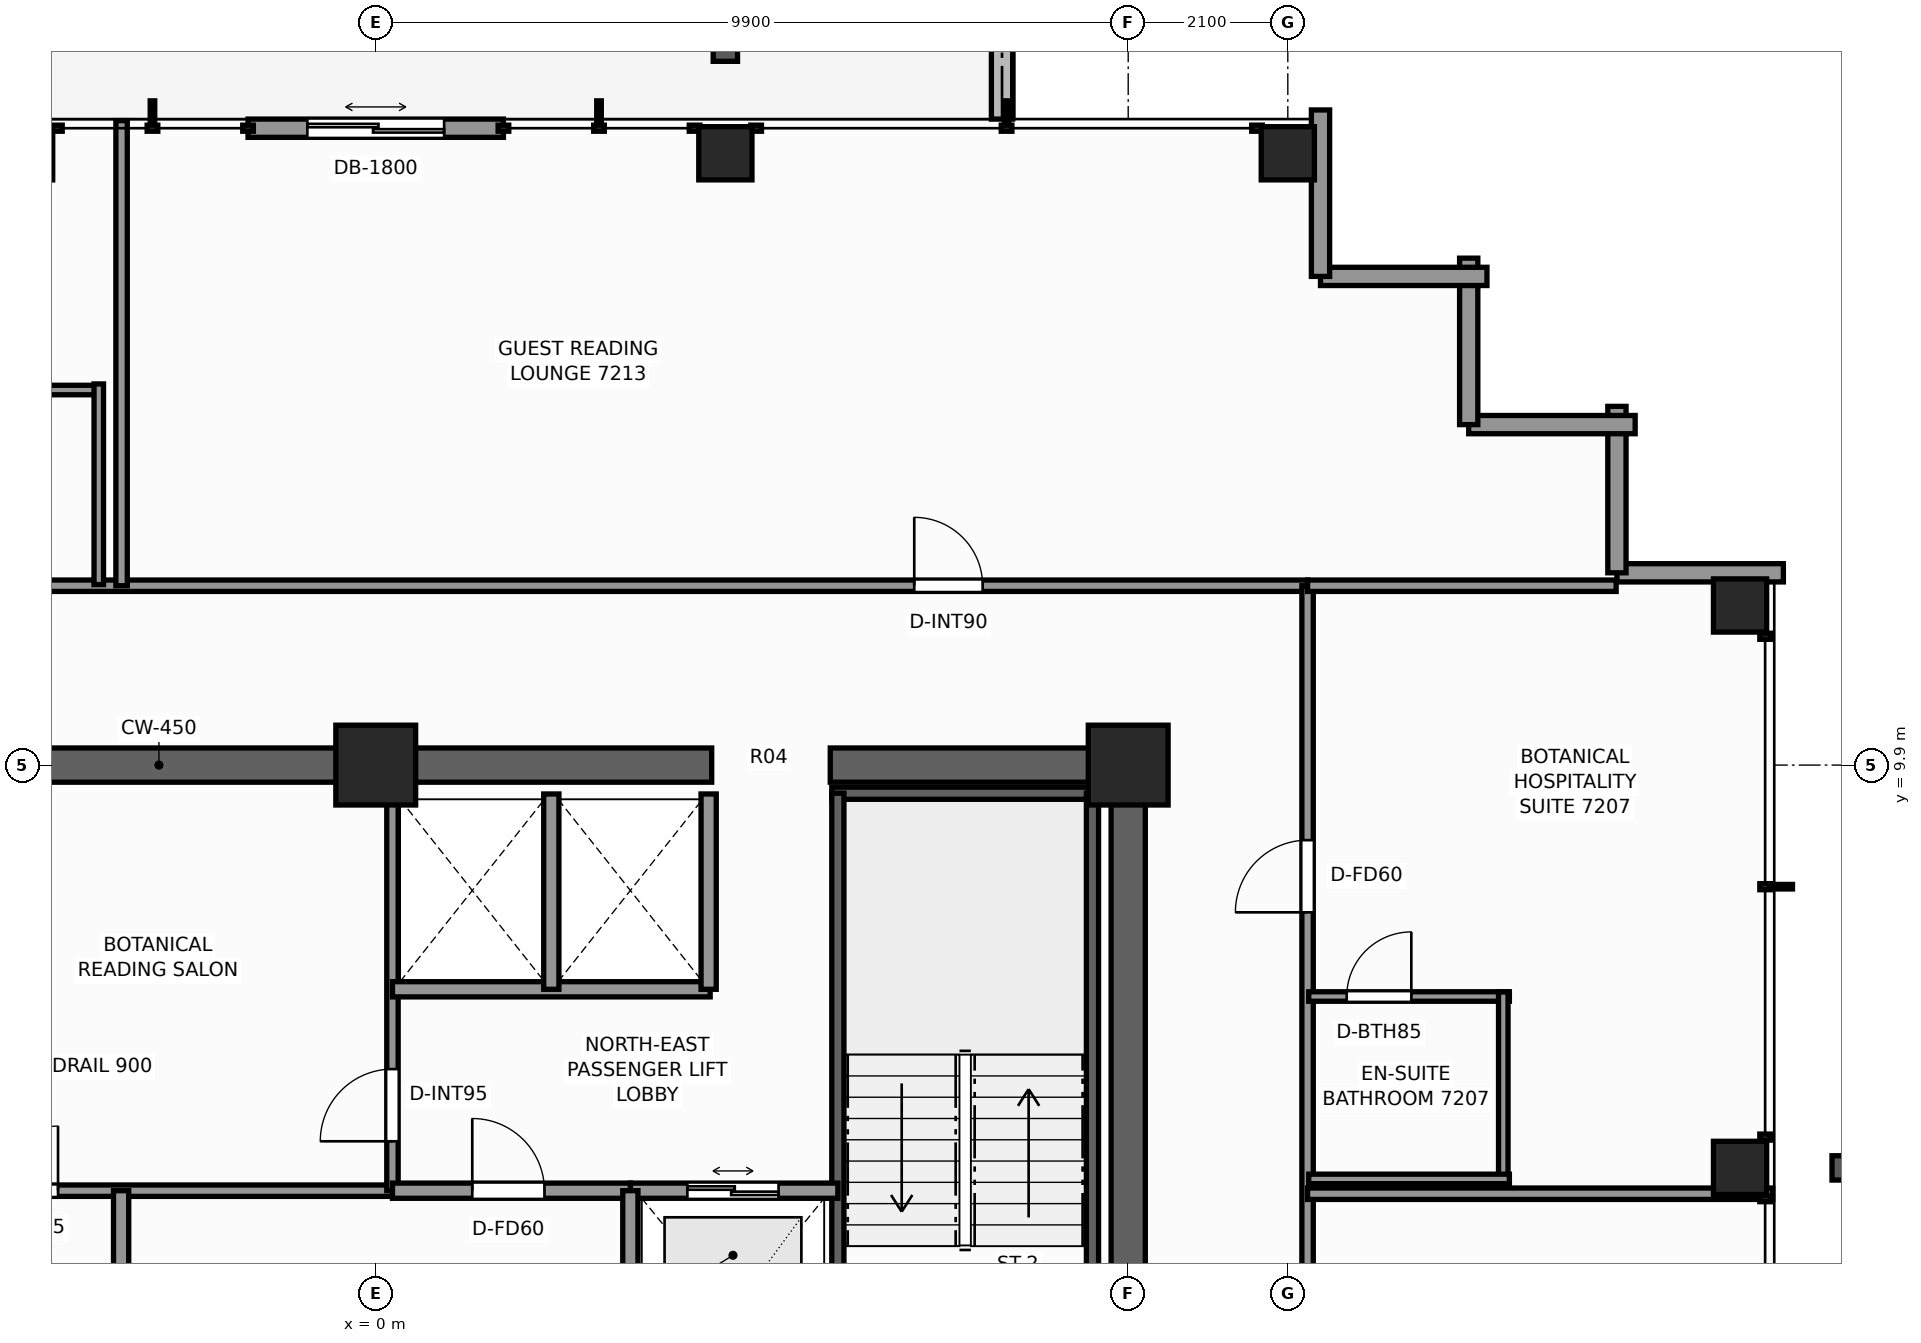
"""IFC4 building model, lengths in metres.
Left out: names, types, materials, properties, quantities, classifications, styles, units other than length and angle.
Written with IfcOpenShell. Run it as: python <this file> out.ifc"""

import sys

from ifc_helpers import new_model, si_unit, direction, frame, frame_2d, origin, origin_2d, place, context, subcontext, project, spatial, rectangle, extrude, element, fill, save


model = new_model("IFC4")
c1 = context("Model", 3, precision=1e-05, world=origin(), true_north=direction((0.0, 1.0)))
c2 = subcontext(c1, "Body", "Model", "MODEL_VIEW")
j1 = project(units=[si_unit("LENGTHUNIT", "METRE"), si_unit("PLANEANGLEUNIT", "RADIAN")], contexts=[c1])
p1 = place(None, origin())
s1 = spatial("IfcSite", under=j1, at=p1, CompositionType="ELEMENT")
p2 = place(p1, origin())
s2 = spatial("IfcBuilding", under=s1, at=p2, CompositionType="ELEMENT")
p3 = place(p2, frame((0.0, 0.0, 247.9)))
s3 = spatial("IfcBuildingStorey", under=s2, at=p3, CompositionType="ELEMENT", Elevation=247.9)
p4 = place(p3, frame((-10.125, 9.9, 0.0), z_axis=(0.0, 0.0, 1.0), x_axis=(1.0, 0.0, 0.0)))
e1 = element("IfcWall", 1, at=p4, inside=s3, PredefinedType="SHEAR", context=c2, shape_type="SweptSolid", body=[
    extrude(rectangle(XDim=14.545, YDim=0.45, at=frame_2d((7.272, 0.0))), origin(), (0.0, 0.0, 1.0), 3.5),
])
p5 = place(p3, frame((5.98, 9.9, 0.0), z_axis=(0.0, 0.0, 1.0), x_axis=(1.0, 0.0, 0.0)))
e2 = element("IfcWall", 2, at=p5, inside=s3, PredefinedType="SHEAR", context=c2, shape_type="SweptSolid", body=[
    extrude(rectangle(XDim=4.145, YDim=0.45, at=frame_2d((2.073, 0.0))), origin(), (0.0, 0.0, 1.0), 3.5),
])
p6 = place(p3, frame((9.9, -3.7, 0.0), z_axis=(0.0, 0.0, 1.0), x_axis=(0.0, 1.0, 0.0)))
e3 = element("IfcWall", 3, at=p6, inside=s3, PredefinedType="SHEAR", context=c2, shape_type="SweptSolid", body=[
    extrude(rectangle(XDim=13.375, YDim=0.45, at=frame_2d((6.688, 0.0))), origin(), (0.0, 0.0, 1.0), 3.5),
])
p7 = place(p6, frame((0.35, 0.0, 0.0)))
e4 = element("IfcOpeningElement", 4, at=p7, cuts=e3, PredefinedType="OPENING", context=c2, shape_type="SweptSolid", body=[
    extrude(rectangle(XDim=1.1, YDim=2.2, at=frame_2d((0.55, 1.1))), frame((0.0, 0.235, 0.0), z_axis=(0.0, -1.0, 0.0), x_axis=(1.0, 0.0, 0.0)), (0.0, 0.0, 1.0), 0.47),
])
for number, where, z_axis, x_axis in (
    (5, (9.9, 9.9, 0.0), (0.0, 0.0, 1.0), (1.0, 0.0, 0.0)),
    (6, (0.0, 9.9, 0.0), (0.0, 0.0, 1.0), (1.0, 0.0, 0.0)),
):
    element("IfcColumn", number, at=place(p3, frame(where, z_axis=z_axis, x_axis=x_axis)), inside=s3, PredefinedType="COLUMN", context=c2, shape_type="SweptSolid", body=[
        extrude(rectangle(XDim=1.05, YDim=1.05, at=origin_2d()), origin(), (0.0, 0.0, 1.0), 3.5),
    ])
for number, where, z_axis, x_axis in (
    (7, (-4.6, 17.95, 0.0), (0.0, 0.0, 1.0), (1.0, 0.0, 0.0)),
    (8, (4.6, 17.95, 0.0), (0.0, 0.0, 1.0), (1.0, 0.0, 0.0)),
    (9, (12.0, 17.95, 0.0), (0.0, 0.0, 1.0), (1.0, 0.0, 0.0)),
    (10, (17.95, 4.6, 0.0), (0.0, 0.0, 1.0), (1.0, 0.0, 0.0)),
    (11, (17.95, 12.0, 0.0), (0.0, 0.0, 1.0), (1.0, 0.0, 0.0)),
):
    element("IfcColumn", number, at=place(p3, frame(where, z_axis=z_axis, x_axis=x_axis)), inside=s3, PredefinedType="COLUMN", context=c2, shape_type="SweptSolid", body=[
        extrude(rectangle(XDim=0.7, YDim=0.7, at=origin_2d()), origin(), (0.0, 0.0, 1.0), 3.5),
    ])
p8 = place(p3, frame((8.24, 18.4, -0.07), z_axis=(0.0, 0.0, 1.0), x_axis=(0.0, 1.0, 0.0)))
e12 = element("IfcWall", 12, at=p8, inside=s3, PredefinedType="PARAPET", context=c2, shape_type="SweptSolid", body=[
    extrude(rectangle(XDim=3.42, YDim=0.28, at=frame_2d((1.71, 0.0))), origin(), (0.0, 0.0, 1.0), 0.42),
])
p9 = place(p3, frame((16.33, 12.43, 0.0), z_axis=(0.0, 0.0, 1.0), x_axis=(1.0, 0.0, 0.0)))
e13 = element("IfcWall", 13, at=p9, inside=s3, PredefinedType="STANDARD", context=c2, shape_type="SweptSolid", body=[
    extrude(rectangle(XDim=2.19, YDim=0.24, at=frame_2d((1.095, 0.0))), origin(), (0.0, 0.0, 1.0), 2.633),
])
for number, where, z_axis, x_axis in (
    (14, (16.33, 14.62, 0.0), (0.0, 0.0, 1.0), (0.0, -1.0, 0.0)),
    (15, (14.38, 14.38, 0.0), (0.0, 0.0, 1.0), (1.0, 0.0, 0.0)),
    (16, (14.38, 16.57, 0.0), (0.0, 0.0, 1.0), (0.0, -1.0, 0.0)),
    (17, (12.43, 16.33, 0.0), (0.0, 0.0, 1.0), (1.0, 0.0, 0.0)),
):
    element("IfcWall", number, at=place(p3, frame(where, z_axis=z_axis, x_axis=x_axis)), inside=s3, PredefinedType="STANDARD", context=c2, shape_type="SweptSolid", body=[
        extrude(rectangle(XDim=2.19, YDim=0.24, at=frame_2d((1.095, 0.0))), origin(), (0.0, 0.0, 1.0), 2.633),
    ])
p10 = place(p3, frame((12.43, 18.52, 0.0), z_axis=(0.0, 0.0, 1.0), x_axis=(0.0, -1.0, 0.0)))
e18 = element("IfcWall", 18, at=p10, inside=s3, PredefinedType="STANDARD", context=c2, shape_type="SweptSolid", body=[
    extrude(rectangle(XDim=2.19, YDim=0.24, at=frame_2d((1.095, 0.0))), origin(), (0.0, 0.0, 1.0), 2.633),
])
p11 = place(p3, frame((-1.68, 18.28, 0.0), z_axis=(0.0, 0.0, 1.0), x_axis=(1.0, 0.0, 0.0)))
e19 = element("IfcWall", 19, at=p11, inside=s3, PredefinedType="STANDARD", context=c2, shape_type="SweptSolid", body=[
    extrude(rectangle(XDim=3.36, YDim=0.24, at=frame_2d((1.68, 0.0))), origin(), (0.0, 0.0, 1.0), 3.25),
])
p12 = place(p11, frame((0.78, 0.0, 0.0)))
e20 = element("IfcOpeningElement", 20, at=p12, cuts=e19, PredefinedType="OPENING", context=c2, shape_type="SweptSolid", body=[
    extrude(rectangle(XDim=1.8, YDim=2.2, at=frame_2d((0.9, 1.1))), frame((0.0, 0.13, 0.0), z_axis=(0.0, -1.0, 0.0), x_axis=(1.0, 0.0, 0.0)), (0.0, 0.0, 1.0), 0.26),
])
p13 = place(p3, frame((6.0, 9.53, 0.0), z_axis=(0.0, 0.0, 1.0), x_axis=(1.0, 0.0, 0.0)))
e21 = element("IfcWall", 21, at=p13, inside=s3, PredefinedType="SHEAR", context=c2, shape_type="SweptSolid", body=[
    extrude(rectangle(XDim=3.52, YDim=0.16, at=frame_2d((1.76, 0.0))), origin(), (0.0, 0.0, 1.0), 3.5),
])
for number, where, z_axis, x_axis in (
    (22, (6.08, 1.97, 0.0), (0.0, 0.0, 1.0), (0.0, 1.0, 0.0)),
    (23, (9.43, 1.97, 0.0), (0.0, 0.0, 1.0), (0.0, 1.0, 0.0)),
):
    element("IfcWall", number, at=place(p3, frame(where, z_axis=z_axis, x_axis=x_axis)), inside=s3, PredefinedType="SHEAR", context=c2, shape_type="SweptSolid", body=[
        extrude(rectangle(XDim=7.56, YDim=0.16, at=frame_2d((3.78, 0.0))), origin(), (0.0, 0.0, 1.0), 3.5),
    ])
p14 = place(p3, frame((3.35, 4.3, 0.0), z_axis=(0.0, 0.0, 1.0), x_axis=(1.0, 0.0, 0.0)))
e24 = element("IfcWall", 24, at=p14, inside=s3, PredefinedType="SOLIDWALL", context=c2, shape_type="SweptSolid", body=[
    extrude(rectangle(XDim=2.73, YDim=0.2, at=frame_2d((1.365, 0.0))), origin(), (0.0, 0.0, 1.0), 3.25),
])
p15 = place(p14, frame((0.75, 0.0, 0.0)))
e25 = element("IfcOpeningElement", 25, at=p15, cuts=e24, PredefinedType="OPENING", context=c2, shape_type="SweptSolid", body=[
    extrude(rectangle(XDim=1.2, YDim=2.25, at=frame_2d((0.6, 1.125))), frame((0.0, 0.11, 0.0), z_axis=(0.0, -1.0, 0.0), x_axis=(1.0, 0.0, 0.0)), (0.0, 0.0, 1.0), 0.22),
])
p16 = place(p3, frame((-6.08, 4.3, 0.0), z_axis=(0.0, 0.0, 1.0), x_axis=(1.0, 0.0, 0.0)))
e26 = element("IfcWall", 26, at=p16, inside=s3, PredefinedType="PARTITIONING", context=c2, shape_type="SweptSolid", body=[
    extrude(rectangle(XDim=6.3, YDim=0.15, at=frame_2d((3.15, 0.0))), origin(), (0.0, 0.0, 1.0), 3.25),
])
p17 = place(p16, frame((1.05, 0.0, 0.0)))
e27 = element("IfcOpeningElement", 27, at=p17, cuts=e26, PredefinedType="OPENING", context=c2, shape_type="SweptSolid", body=[
    extrude(rectangle(XDim=0.85, YDim=2.03, at=frame_2d((0.425, 1.015))), frame((0.0, 0.085, 0.0), z_axis=(0.0, -1.0, 0.0), x_axis=(1.0, 0.0, 0.0)), (0.0, 0.0, 1.0), 0.17),
])
p18 = place(p3, frame((0.22, 4.3, 0.0), z_axis=(0.0, 0.0, 1.0), x_axis=(0.0, 1.0, 0.0)))
e28 = element("IfcWall", 28, at=p18, inside=s3, PredefinedType="PARTITIONING", context=c2, shape_type="SweptSolid", body=[
    extrude(rectangle(XDim=5.22, YDim=0.15, at=frame_2d((2.61, 0.0))), origin(), (0.0, 0.0, 1.0), 3.25),
])
p19 = place(p18, frame((0.65, 0.0, 0.0)))
e29 = element("IfcOpeningElement", 29, at=p19, cuts=e28, PredefinedType="OPENING", context=c2, shape_type="SweptSolid", body=[
    extrude(rectangle(XDim=0.95, YDim=2.06, at=frame_2d((0.475, 1.03))), frame((0.0, 0.085, 0.0), z_axis=(0.0, -1.0, 0.0), x_axis=(1.0, 0.0, 0.0)), (0.0, 0.0, 1.0), 0.17),
])
p20 = place(p3, frame((0.22, 6.95, 0.0), z_axis=(0.0, 0.0, 1.0), x_axis=(1.0, 0.0, 0.0)))
e30 = element("IfcWall", 30, at=p20, inside=s3, PredefinedType="SOLIDWALL", context=c2, shape_type="SweptSolid", body=[
    extrude(rectangle(XDim=4.18, YDim=0.2, at=frame_2d((2.09, 0.0))), origin(), (0.0, 0.0, 1.0), 3.25),
])
for number, where, z_axis, x_axis in (
    (31, (4.38, 6.95, 0.0), (0.0, 0.0, 1.0), (0.0, 1.0, 0.0)),
    (32, (2.31, 6.95, 0.0), (0.0, 0.0, 1.0), (0.0, 1.0, 0.0)),
):
    element("IfcWall", number, at=place(p3, frame(where, z_axis=z_axis, x_axis=x_axis)), inside=s3, PredefinedType="SOLIDWALL", context=c2, shape_type="SweptSolid", body=[
        extrude(rectangle(XDim=2.57, YDim=0.2, at=frame_2d((1.285, 0.0))), origin(), (0.0, 0.0, 1.0), 3.25),
    ])
p21 = place(p3, frame((0.22, 4.3, 0.0), z_axis=(0.0, 0.0, 1.0), x_axis=(1.0, 0.0, 0.0)))
e33 = element("IfcWall", 33, at=p21, inside=s3, PredefinedType="SOLIDWALL", context=c2, shape_type="SweptSolid", body=[
    extrude(rectangle(XDim=3.13, YDim=0.2, at=frame_2d((1.565, 0.0))), origin(), (0.0, 0.0, 1.0), 3.25),
])
p22 = place(p21, frame((1.05, 0.0, 0.0)))
e34 = element("IfcOpeningElement", 34, at=p22, cuts=e33, PredefinedType="OPENING", context=c2, shape_type="SweptSolid", body=[
    extrude(rectangle(XDim=0.95, YDim=2.06, at=frame_2d((0.475, 1.03))), frame((0.0, 0.11, 0.0), z_axis=(0.0, -1.0, 0.0), x_axis=(1.0, 0.0, 0.0)), (0.0, 0.0, 1.0), 0.22),
])
for number, where, z_axis, x_axis in (
    (35, (-3.35, 1.1, 0.0), (0.0, 0.0, 1.0), (0.0, 1.0, 0.0)),
    (36, (3.35, 1.1, 0.0), (0.0, 0.0, 1.0), (0.0, 1.0, 0.0)),
):
    element("IfcWall", number, at=place(p3, frame(where, z_axis=z_axis, x_axis=x_axis)), inside=s3, PredefinedType="SOLIDWALL", context=c2, shape_type="SweptSolid", body=[
        extrude(rectangle(XDim=3.2, YDim=0.2, at=frame_2d((1.6, 0.0))), origin(), (0.0, 0.0, 1.0), 3.25),
    ])
p23 = place(p3, frame((-12.58, 12.26, 0.0), z_axis=(0.0, 0.0, 1.0), x_axis=(1.0, 0.0, 0.0)))
e37 = element("IfcWall", 37, at=p23, inside=s3, PredefinedType="PARTITIONING", context=c2, shape_type="SweptSolid", body=[
    extrude(rectangle(XDim=24.84, YDim=0.15, at=frame_2d((12.42, 0.0))), origin(), (0.0, 0.0, 1.0), 2.539),
])
p24 = place(p23, frame((4.073, 0.0, 0.0)))
e38 = element("IfcOpeningElement", 38, at=p24, cuts=e37, PredefinedType="OPENING", context=c2, shape_type="SweptSolid", body=[
    extrude(rectangle(XDim=0.95, YDim=2.06, at=frame_2d((0.475, 1.03))), frame((0.0, 0.085, 0.0), z_axis=(0.0, -1.0, 0.0), x_axis=(1.0, 0.0, 0.0)), (0.0, 0.0, 1.0), 0.17),
])
p25 = place(p23, frame((19.665, 0.0, 0.0)))
e39 = element("IfcOpeningElement", 39, at=p25, cuts=e37, PredefinedType="OPENING", context=c2, shape_type="SweptSolid", body=[
    extrude(rectangle(XDim=0.9, YDim=2.06, at=frame_2d((0.45, 1.03))), frame((0.0, 0.085, 0.0), z_axis=(0.0, -1.0, 0.0), x_axis=(1.0, 0.0, 0.0)), (0.0, 0.0, 1.0), 0.17),
])
p26 = place(p3, frame((12.26, -12.58, 0.0), z_axis=(0.0, 0.0, 1.0), x_axis=(0.0, 1.0, 0.0)))
e40 = element("IfcWall", 40, at=p26, inside=s3, PredefinedType="PARTITIONING", context=c2, shape_type="SweptSolid", body=[
    extrude(rectangle(XDim=24.84, YDim=0.15, at=frame_2d((12.42, 0.0))), origin(), (0.0, 0.0, 1.0), 2.539),
])
p27 = place(p26, frame((4.228, 0.0, 0.0)))
e41 = element("IfcOpeningElement", 41, at=p27, cuts=e40, PredefinedType="OPENING", context=c2, shape_type="SweptSolid", body=[
    extrude(rectangle(XDim=0.95, YDim=2.06, at=frame_2d((0.475, 1.03))), frame((0.0, 0.085, 0.0), z_axis=(0.0, -1.0, 0.0), x_axis=(1.0, 0.0, 0.0)), (0.0, 0.0, 1.0), 0.17),
])
p28 = place(p26, frame((14.135, 0.0, 0.0)))
e42 = element("IfcOpeningElement", 42, at=p28, cuts=e40, PredefinedType="OPENING", context=c2, shape_type="SweptSolid", body=[
    extrude(rectangle(XDim=0.95, YDim=2.06, at=frame_2d((0.475, 1.03))), frame((0.0, 0.085, 0.0), z_axis=(0.0, -1.0, 0.0), x_axis=(1.0, 0.0, 0.0)), (0.0, 0.0, 1.0), 0.17),
])
p29 = place(p26, frame((20.542, 0.0, 0.0)))
e43 = element("IfcOpeningElement", 43, at=p29, cuts=e40, PredefinedType="OPENING", context=c2, shape_type="SweptSolid", body=[
    extrude(rectangle(XDim=0.95, YDim=2.06, at=frame_2d((0.475, 1.03))), frame((0.0, 0.085, 0.0), z_axis=(0.0, -1.0, 0.0), x_axis=(1.0, 0.0, 0.0)), (0.0, 0.0, 1.0), 0.17),
])
p30 = place(p3, frame((12.26, 12.26, 0.0), z_axis=(0.0, 0.0, 1.0), x_axis=(1.0, 0.0, 0.0)))
e44 = element("IfcWall", 44, at=p30, inside=s3, PredefinedType="PARTITIONING", context=c2, shape_type="SweptSolid", body=[
    extrude(rectangle(XDim=4.06, YDim=0.15, at=frame_2d((2.03, 0.0))), origin(), (0.0, 0.0, 1.0), 3.25),
])
p31 = place(p3, frame((12.26, 4.26, 0.0), z_axis=(0.0, 0.0, 1.0), x_axis=(1.0, 0.0, 0.0)))
e45 = element("IfcWall", 45, at=p31, inside=s3, PredefinedType="PARTITIONING", context=c2, shape_type="SweptSolid", body=[
    extrude(rectangle(XDim=6.12, YDim=0.15, at=frame_2d((3.06, 0.0))), origin(), (0.0, 0.0, 1.0), 2.623),
])
p32 = place(p3, frame((12.275, 6.855, 0.0), z_axis=(0.0, 0.0, 1.0), x_axis=(1.0, 0.0, 0.0)))
e46 = element("IfcWall", 46, at=p32, inside=s3, PredefinedType="PARTITIONING", context=c2, shape_type="SweptSolid", body=[
    extrude(rectangle(XDim=2.64, YDim=0.125, at=frame_2d((1.32, 0.0))), origin(), (0.0, 0.0, 1.0), 3.25),
])
p33 = place(p32, frame((0.5, 0.0, 0.0)))
e47 = element("IfcOpeningElement", 47, at=p33, cuts=e46, PredefinedType="OPENING", context=c2, shape_type="SweptSolid", body=[
    extrude(rectangle(XDim=0.85, YDim=2.03, at=frame_2d((0.425, 1.015))), frame((0.0, 0.073, 0.0), z_axis=(0.0, -1.0, 0.0), x_axis=(1.0, 0.0, 0.0)), (0.0, 0.0, 1.0), 0.145),
])
p34 = place(p3, frame((14.835, 4.395, 0.0), z_axis=(0.0, 0.0, 1.0), x_axis=(0.0, 1.0, 0.0)))
e48 = element("IfcWall", 48, at=p34, inside=s3, PredefinedType="PARTITIONING", context=c2, shape_type="SweptSolid", body=[
    extrude(rectangle(XDim=2.52, YDim=0.125, at=frame_2d((1.26, 0.0))), origin(), (0.0, 0.0, 1.0), 2.539),
])
p35 = place(p3, frame((12.275, 4.455, 0.0), z_axis=(0.0, 0.0, 1.0), x_axis=(1.0, 0.0, 0.0)))
e49 = element("IfcWall", 49, at=p35, inside=s3, PredefinedType="PARTITIONING", context=c2, shape_type="SweptSolid", body=[
    extrude(rectangle(XDim=2.64, YDim=0.125, at=frame_2d((1.32, 0.0))), origin(), (0.0, 0.0, 1.0), 2.539),
])
p36 = place(p3, frame((-3.344, 12.26, 0.0), z_axis=(0.0, 0.0, 1.0), x_axis=(0.0, 1.0, 0.0)))
e50 = element("IfcWall", 50, at=p36, inside=s3, PredefinedType="PARTITIONING", context=c2, shape_type="SweptSolid", body=[
    extrude(rectangle(XDim=6.12, YDim=0.15, at=frame_2d((3.06, 0.0))), origin(), (0.0, 0.0, 1.0), 2.539),
])
p37 = place(p3, frame((-6.104, 14.835, 0.0), z_axis=(0.0, 0.0, 1.0), x_axis=(1.0, 0.0, 0.0)))
e51 = element("IfcWall", 51, at=p37, inside=s3, PredefinedType="PARTITIONING", context=c2, shape_type="SweptSolid", body=[
    extrude(rectangle(XDim=2.52, YDim=0.125, at=frame_2d((1.26, 0.0))), origin(), (0.0, 0.0, 1.0), 2.539),
])
p38 = place(p3, frame((-3.644, 12.275, 0.0), z_axis=(0.0, 0.0, 1.0), x_axis=(0.0, 1.0, 0.0)))
e52 = element("IfcWall", 52, at=p38, inside=s3, PredefinedType="PARTITIONING", context=c2, shape_type="SweptSolid", body=[
    extrude(rectangle(XDim=2.64, YDim=0.125, at=frame_2d((1.32, 0.0))), origin(), (0.0, 0.0, 1.0), 3.25),
])
p39 = place(p12, origin())
e53 = element("IfcDoor", 53, at=p39, inside=s3, OperationType="DOUBLE_DOOR_SLIDING", PredefinedType="DOOR", context=c2, shape_type="SweptSolid", body=[
    extrude(rectangle(XDim=1.8, YDim=2.2, at=frame_2d((0.9, 1.1))), frame((0.0, 0.025, 0.0), z_axis=(0.0, -1.0, 0.0), x_axis=(1.0, 0.0, 0.0)), (0.0, 0.0, 1.0), 0.05),
])
fill(e20, e53)
p40 = place(p15, origin())
e54 = element("IfcDoor", 54, at=p40, inside=s3, OperationType="DOUBLE_DOOR_SLIDING", PredefinedType="DOOR", context=c2, shape_type="SweptSolid", body=[
    extrude(rectangle(XDim=1.2, YDim=2.25, at=frame_2d((0.6, 1.125))), frame((0.0, 0.025, 0.0), z_axis=(0.0, -1.0, 0.0), x_axis=(1.0, 0.0, 0.0)), (0.0, 0.0, 1.0), 0.05),
])
fill(e25, e54)
p41 = place(p19, origin())
e55 = element("IfcDoor", 55, at=p41, inside=s3, OperationType="SINGLE_SWING_LEFT", PredefinedType="DOOR", context=c2, shape_type="SweptSolid", body=[
    extrude(rectangle(XDim=0.95, YDim=2.06, at=frame_2d((0.475, 1.03))), frame((0.0, 0.025, 0.0), z_axis=(0.0, -1.0, 0.0), x_axis=(1.0, 0.0, 0.0)), (0.0, 0.0, 1.0), 0.05),
])
fill(e29, e55)
p42 = place(p22, origin())
e56 = element("IfcDoor", 56, at=p42, inside=s3, OperationType="SINGLE_SWING_LEFT", PredefinedType="DOOR", context=c2, shape_type="SweptSolid", body=[
    extrude(rectangle(XDim=0.95, YDim=2.06, at=frame_2d((0.475, 1.03))), frame((0.0, 0.025, 0.0), z_axis=(0.0, -1.0, 0.0), x_axis=(1.0, 0.0, 0.0)), (0.0, 0.0, 1.0), 0.05),
])
fill(e34, e56)
p43 = place(p17, origin())
e57 = element("IfcDoor", 57, at=p43, inside=s3, OperationType="SINGLE_SWING_RIGHT", PredefinedType="DOOR", context=c2, shape_type="SweptSolid", body=[
    extrude(rectangle(XDim=0.85, YDim=2.03, at=frame_2d((0.425, 1.015))), frame((0.0, 0.025, 0.0), z_axis=(0.0, -1.0, 0.0), x_axis=(1.0, 0.0, 0.0)), (0.0, 0.0, 1.0), 0.05),
])
fill(e27, e57)
p44 = place(p33, origin())
e58 = element("IfcDoor", 58, at=p44, inside=s3, OperationType="SINGLE_SWING_RIGHT", PredefinedType="DOOR", context=c2, shape_type="SweptSolid", body=[
    extrude(rectangle(XDim=0.85, YDim=2.03, at=frame_2d((0.425, 1.015))), frame((0.0, 0.025, 0.0), z_axis=(0.0, -1.0, 0.0), x_axis=(1.0, 0.0, 0.0)), (0.0, 0.0, 1.0), 0.05),
])
fill(e47, e58)
p45 = place(p29, origin())
e59 = element("IfcDoor", 59, at=p45, inside=s3, OperationType="SINGLE_SWING_LEFT", PredefinedType="DOOR", context=c2, shape_type="SweptSolid", body=[
    extrude(rectangle(XDim=0.95, YDim=2.06, at=frame_2d((0.475, 1.03))), frame((0.0, 0.025, 0.0), z_axis=(0.0, -1.0, 0.0), x_axis=(1.0, 0.0, 0.0)), (0.0, 0.0, 1.0), 0.05),
])
fill(e43, e59)
p46 = place(p25, origin())
e60 = element("IfcDoor", 60, at=p46, inside=s3, OperationType="SINGLE_SWING_LEFT", PredefinedType="DOOR", context=c2, shape_type="SweptSolid", body=[
    extrude(rectangle(XDim=0.9, YDim=2.06, at=frame_2d((0.45, 1.03))), frame((0.0, 0.025, 0.0), z_axis=(0.0, -1.0, 0.0), x_axis=(1.0, 0.0, 0.0)), (0.0, 0.0, 1.0), 0.05),
])
fill(e39, e60)
save(model, sys.argv[1])
